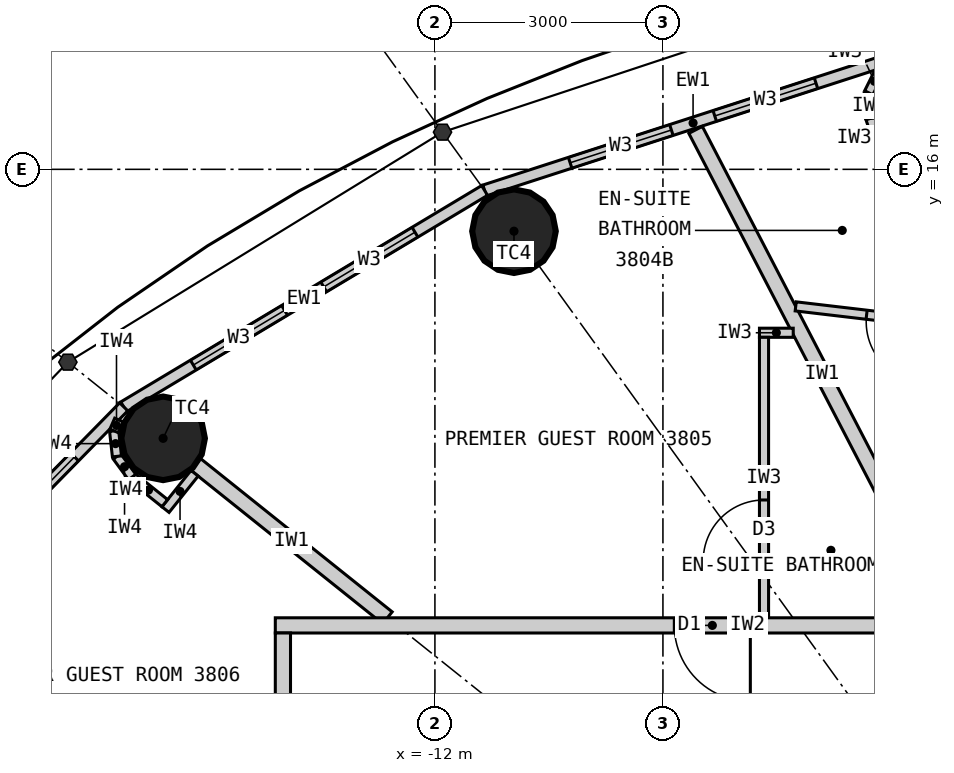
"""IFC4 building model, lengths in metres.
Left out: names, types, materials, properties, quantities, classifications, styles, units other than length and angle.
Written with IfcOpenShell. Run it as: python <this file> out.ifc"""

import sys

from ifc_helpers import new_model, si_unit, direction, frame, frame_2d, origin, origin_2d, place, context, subcontext, project, spatial, rectangle, circle, extrude, element, fill, save


model = new_model("IFC4")
c1 = context("Model", 3, precision=1e-05, world=origin(), true_north=direction((0.0, 1.0)))
c2 = subcontext(c1, "Body", "Model", "MODEL_VIEW")
j1 = project(units=[si_unit("LENGTHUNIT", "METRE"), si_unit("PLANEANGLEUNIT", "RADIAN")], contexts=[c1])
p1 = place(None, origin())
s1 = spatial("IfcSite", under=j1, at=p1, CompositionType="ELEMENT")
p2 = place(p1, origin())
s2 = spatial("IfcBuilding", under=s1, at=p2, CompositionType="ELEMENT")
p3 = place(p2, frame((0.0, 0.0, 146.7)))
s3 = spatial("IfcBuildingStorey", under=s2, at=p3, CompositionType="ELEMENT", Elevation=146.7)
for number, where, z_axis, x_axis in (
    (1, (-10.96, 15.186, 0.0), (0.0, 0.0, 1.0), (1.0, 0.0, 0.0)),
    (2, (-15.576, 12.461, 0.0), (0.0, 0.0, 1.0), (1.0, 0.0, 0.0)),
):
    element("IfcColumn", number, at=place(p3, frame(where, z_axis=z_axis, x_axis=x_axis)), inside=s3, PredefinedType="COLUMN", context=c2, shape_type="SweptSolid", body=[
        extrude(circle(Radius=0.55, at=origin_2d()), origin(), (0.0, 0.0, 1.0), 3.3),
    ])
p4 = place(p3, frame((-5.86, 17.497, 0.0), z_axis=(0.0, 0.0, 1.0), x_axis=(-0.951432482129, -0.307857486429, 0.0)))
e3 = element("IfcWall", 3, at=p4, inside=s3, PredefinedType="ELEMENTEDWALL", context=c2, shape_type="SweptSolid", body=[
    extrude(rectangle(XDim=5.766, YDim=0.15, at=frame_2d((2.883, 0.0))), origin(), (0.0, 0.0, 1.0), 3.12),
])
p5 = place(p4, frame((1.183, 0.0, 0.9)))
e4 = element("IfcOpeningElement", 4, at=p5, cuts=e3, PredefinedType="OPENING", context=c2, shape_type="SweptSolid", body=[
    extrude(rectangle(XDim=1.4, YDim=1.9, at=frame_2d((0.7, 0.95))), frame((0.0, 0.085, 0.0), z_axis=(0.0, -1.0, 0.0), x_axis=(1.0, 0.0, 0.0)), (0.0, 0.0, 1.0), 0.17),
])
p6 = place(p4, frame((3.183, 0.0, 0.9)))
e5 = element("IfcOpeningElement", 5, at=p6, cuts=e3, PredefinedType="OPENING", context=c2, shape_type="SweptSolid", body=[
    extrude(rectangle(XDim=1.4, YDim=1.9, at=frame_2d((0.7, 0.95))), frame((0.0, 0.085, 0.0), z_axis=(0.0, -1.0, 0.0), x_axis=(1.0, 0.0, 0.0)), (0.0, 0.0, 1.0), 0.17),
])
p7 = place(p3, frame((-11.346, 15.722, 0.0), z_axis=(0.0, 0.0, 1.0), x_axis=(-0.857695199231, -0.514158482587, 0.0)))
e6 = element("IfcWall", 6, at=p7, inside=s3, PredefinedType="ELEMENTEDWALL", context=c2, shape_type="SweptSolid", body=[
    extrude(rectangle(XDim=5.536, YDim=0.15, at=frame_2d((2.768, 0.0))), origin(), (0.0, 0.0, 1.0), 3.12),
])
p8 = place(p7, frame((1.068, 0.0, 0.9)))
e7 = element("IfcOpeningElement", 7, at=p8, cuts=e6, PredefinedType="OPENING", context=c2, shape_type="SweptSolid", body=[
    extrude(rectangle(XDim=1.4, YDim=1.9, at=frame_2d((0.7, 0.95))), frame((0.0, 0.085, 0.0), z_axis=(0.0, -1.0, 0.0), x_axis=(1.0, 0.0, 0.0)), (0.0, 0.0, 1.0), 0.17),
])
p9 = place(p7, frame((3.068, 0.0, 0.9)))
e8 = element("IfcOpeningElement", 8, at=p9, cuts=e6, PredefinedType="OPENING", context=c2, shape_type="SweptSolid", body=[
    extrude(rectangle(XDim=1.4, YDim=1.9, at=frame_2d((0.7, 0.95))), frame((0.0, 0.085, 0.0), z_axis=(0.0, -1.0, 0.0), x_axis=(1.0, 0.0, 0.0)), (0.0, 0.0, 1.0), 0.17),
])
p10 = place(p3, frame((-16.095, 12.876, 0.0), z_axis=(0.0, 0.0, 1.0), x_axis=(-0.700727467776, -0.71342905457, 0.0)))
e9 = element("IfcWall", 9, at=p10, inside=s3, PredefinedType="ELEMENTEDWALL", context=c2, shape_type="SweptSolid", body=[
    extrude(rectangle(XDim=5.247, YDim=0.15, at=frame_2d((2.624, 0.0))), origin(), (0.0, 0.0, 1.0), 3.12),
])
p11 = place(p10, frame((0.924, 0.0, 0.9)))
e10 = element("IfcOpeningElement", 10, at=p11, cuts=e9, PredefinedType="OPENING", context=c2, shape_type="SweptSolid", body=[
    extrude(rectangle(XDim=1.4, YDim=1.9, at=frame_2d((0.7, 0.95))), frame((0.0, 0.085, 0.0), z_axis=(0.0, -1.0, 0.0), x_axis=(1.0, 0.0, 0.0)), (0.0, 0.0, 1.0), 0.17),
])
p12 = place(p10, frame((2.924, 0.0, 0.9)))
e11 = element("IfcOpeningElement", 11, at=p12, cuts=e9, PredefinedType="OPENING", context=c2, shape_type="SweptSolid", body=[
    extrude(rectangle(XDim=1.4, YDim=1.9, at=frame_2d((0.7, 0.95))), frame((0.0, 0.085, 0.0), z_axis=(0.0, -1.0, 0.0), x_axis=(1.0, 0.0, 0.0)), (0.0, 0.0, 1.0), 0.17),
])
p13 = place(p3, frame((-5.24, 10.1, 0.0), z_axis=(0.0, 0.0, 1.0), x_axis=(-0.460532965373, 0.887642601391, 0.0)))
e12 = element("IfcWall", 12, at=p13, inside=s3, PredefinedType="PARTITIONING", context=c2, shape_type="SweptSolid", body=[
    extrude(rectangle(XDim=7.231, YDim=0.2, at=frame_2d((3.616, 0.0))), origin(), (0.0, 0.0, 1.0), 3.12),
])
p14 = place(p3, frame((-12.625, 10.1, 0.0), z_axis=(0.0, 0.0, 1.0), x_axis=(-0.780876185034, 0.624685827954, 0.0)))
e13 = element("IfcWall", 13, at=p14, inside=s3, PredefinedType="PARTITIONING", context=c2, shape_type="SweptSolid", body=[
    extrude(rectangle(XDim=3.229, YDim=0.2, at=frame_2d((1.615, 0.0))), origin(), (0.0, 0.0, 1.0), 2.42),
])
p15 = place(p3, frame((-7.253, 14.197, 0.0), z_axis=(0.0, 0.0, 1.0), x_axis=(0.993128188393, -0.117031625725, 0.0)))
e14 = element("IfcWall", 14, at=p15, inside=s3, PredefinedType="PARTITIONING", context=c2, shape_type="SweptSolid", body=[
    extrude(rectangle(XDim=2.678, YDim=0.12, at=frame_2d((1.339, 0.0))), origin(), (0.0, 0.0, 1.0), 3.12),
])
p16 = place(p15, frame((0.939, 0.0, 0.0)))
e15 = element("IfcOpeningElement", 15, at=p16, cuts=e14, PredefinedType="OPENING", context=c2, shape_type="SweptSolid", body=[
    extrude(rectangle(XDim=0.8, YDim=2.1, at=frame_2d((0.4, 1.05))), frame((0.0, 0.07, 0.0), z_axis=(0.0, -1.0, 0.0), x_axis=(1.0, 0.0, 0.0)), (0.0, 0.0, 1.0), 0.14),
])
p17 = place(p3, frame((-6.097, 16.149, 0.0), z_axis=(0.0, 0.0, 1.0), x_axis=(-0.317292604854, 0.948327687514, 0.0)))
e16 = element("IfcWall", 16, at=p17, inside=s3, PredefinedType="PARTITIONING", context=c2, shape_type="SweptSolid", body=[
    extrude(rectangle(XDim=0.55, YDim=0.12, at=frame_2d((0.275, 0.0))), origin(), (0.0, 0.0, 1.0), 3.12),
])
for number, where, z_axis, x_axis in (
    (17, (-6.271, 16.67, 0.0), (0.0, 0.0, 1.0), (-0.061, 0.998, 0.0)),
    (18, (-6.292, 17.007, 0.0), (0.0, 0.0, 1.0), (0.445, 0.895, 0.0)),
):
    element("IfcWall", number, at=place(p3, frame(where, z_axis=z_axis, x_axis=x_axis)), inside=s3, PredefinedType="PARTITIONING", context=c2, shape_type="SweptSolid", body=[
        extrude(rectangle(XDim=0.338, YDim=0.12, at=frame_2d((0.169, 0.0))), origin(), (0.0, 0.0, 1.0), 3.12),
    ])
p18 = place(p3, frame((-7.286, 13.85, 0.0), z_axis=(0.0, 0.0, 1.0), x_axis=(-1.0, 0.0, 0.0)))
e19 = element("IfcWall", 19, at=p18, inside=s3, PredefinedType="PARTITIONING", context=c2, shape_type="SweptSolid", body=[
    extrude(rectangle(XDim=0.444, YDim=0.12, at=frame_2d((0.222, 0.0))), origin(), (0.0, 0.0, 1.0), 3.12),
])
p19 = place(p3, frame((-7.67, 10.1, 0.0), z_axis=(0.0, 0.0, 1.0), x_axis=(0.0, 1.0, 0.0)))
e20 = element("IfcWall", 20, at=p19, inside=s3, PredefinedType="PARTITIONING", context=c2, shape_type="SweptSolid", body=[
    extrude(rectangle(XDim=3.69, YDim=0.12, at=frame_2d((1.845, 0.0))), origin(), (0.0, 0.0, 1.0), 3.12),
])
p20 = place(p19, frame((0.75, 0.0, 0.0)))
e21 = element("IfcOpeningElement", 21, at=p20, cuts=e20, PredefinedType="OPENING", context=c2, shape_type="SweptSolid", body=[
    extrude(rectangle(XDim=0.8, YDim=2.1, at=frame_2d((0.4, 1.05))), frame((0.0, 0.07, 0.0), z_axis=(0.0, -1.0, 0.0), x_axis=(1.0, 0.0, 0.0)), (0.0, 0.0, 1.0), 0.14),
])
p21 = place(p3, frame((-14.1, 10.0, 0.0), z_axis=(0.0, 0.0, 1.0), x_axis=(1.0, 0.0, 0.0)))
e22 = element("IfcWall", 22, at=p21, inside=s3, PredefinedType="PARTITIONING", context=c2, shape_type="SweptSolid", body=[
    extrude(rectangle(XDim=12.43, YDim=0.2, at=frame_2d((6.215, 0.0))), origin(), (0.0, 0.0, 1.0), 3.12),
])
p22 = place(p21, frame((5.25, 0.0, 0.0)))
e23 = element("IfcOpeningElement", 23, at=p22, cuts=e22, PredefinedType="OPENING", context=c2, shape_type="SweptSolid", body=[
    extrude(rectangle(XDim=1.0, YDim=2.2, at=frame_2d((0.5, 1.1))), frame((0.0, 0.11, 0.0), z_axis=(0.0, -1.0, 0.0), x_axis=(1.0, 0.0, 0.0)), (0.0, 0.0, 1.0), 0.22),
])
p23 = place(p3, frame((-14.0, 9.9, 0.0), z_axis=(0.0, 0.0, 1.0), x_axis=(0.0, -1.0, 0.0)))
e24 = element("IfcWall", 24, at=p23, inside=s3, PredefinedType="PARTITIONING", context=c2, shape_type="SweptSolid", body=[
    extrude(rectangle(XDim=8.23, YDim=0.2, at=frame_2d((4.115, 0.0))), origin(), (0.0, 0.0, 1.0), 3.12),
])
p24 = place(p23, frame((1.678, 0.0, 0.0)))
e25 = element("IfcOpeningElement", 25, at=p24, cuts=e24, PredefinedType="OPENING", context=c2, shape_type="SweptSolid", body=[
    extrude(rectangle(XDim=1.0, YDim=2.2, at=frame_2d((0.5, 1.1))), frame((0.0, 0.11, 0.0), z_axis=(0.0, -1.0, 0.0), x_axis=(1.0, 0.0, 0.0)), (0.0, 0.0, 1.0), 0.22),
])
p25 = place(p3, frame((-15.162, 12.002, 0.0), z_axis=(0.0, 0.0, 1.0), x_axis=(-0.624597762427, -0.780946627607, 0.0)))
e26 = element("IfcWall", 26, at=p25, inside=s3, PredefinedType="PARTITIONING", context=c2, shape_type="SweptSolid", body=[
    extrude(rectangle(XDim=0.612, YDim=0.12, at=frame_2d((0.306, 0.0))), origin(), (0.0, 0.0, 1.0), 3.12),
])
p26 = place(p3, frame((-15.554, 11.608, 0.0), z_axis=(0.0, 0.0, 1.0), x_axis=(-0.780695577787, 0.624911525597, 0.0)))
e27 = element("IfcWall", 27, at=p26, inside=s3, PredefinedType="PARTITIONING", context=c2, shape_type="SweptSolid", body=[
    extrude(rectangle(XDim=0.55, YDim=0.12, at=frame_2d((0.275, 0.0))), origin(), (0.0, 0.0, 1.0), 3.12),
])
p27 = place(p3, frame((-15.984, 11.952, 0.0), z_axis=(0.0, 0.0, 1.0), x_axis=(-0.592335221171, 0.805691619517, 0.0)))
e28 = element("IfcWall", 28, at=p27, inside=s3, PredefinedType="PARTITIONING", context=c2, shape_type="SweptSolid", body=[
    extrude(rectangle(XDim=0.338, YDim=0.12, at=frame_2d((0.169, 0.0))), origin(), (0.0, 0.0, 1.0), 3.12),
])
p28 = place(p3, frame((-16.184, 12.224, 0.0), z_axis=(0.0, 0.0, 1.0), x_axis=(-0.110669692975, 0.993857242795, 0.0)))
e29 = element("IfcWall", 29, at=p28, inside=s3, PredefinedType="PARTITIONING", context=c2, shape_type="SweptSolid", body=[
    extrude(rectangle(XDim=0.337, YDim=0.12, at=frame_2d((0.169, 0.0))), origin(), (0.0, 0.0, 1.0), 3.12),
])
p29 = place(p3, frame((-16.221, 12.559, 0.0), z_axis=(0.0, 0.0, 1.0), x_axis=(0.401064416249, 0.916049853457, 0.0)))
e30 = element("IfcWall", 30, at=p29, inside=s3, PredefinedType="PARTITIONING", context=c2, shape_type="SweptSolid", body=[
    extrude(rectangle(XDim=0.156, YDim=0.12, at=frame_2d((0.078, 0.0))), origin(), (0.0, 0.0, 1.0), 3.12),
])
p30 = place(p5, origin())
e31 = element("IfcWindow", 31, at=p30, inside=s3, PartitioningType="SINGLE_PANEL", PredefinedType="WINDOW", context=c2, shape_type="SweptSolid", body=[
    extrude(rectangle(XDim=1.4, YDim=1.9, at=frame_2d((0.7, 0.95))), frame((0.0, 0.03, 0.0), z_axis=(0.0, -1.0, 0.0), x_axis=(1.0, 0.0, 0.0)), (0.0, 0.0, 1.0), 0.06),
])
fill(e4, e31)
p31 = place(p6, origin())
e32 = element("IfcWindow", 32, at=p31, inside=s3, PartitioningType="SINGLE_PANEL", PredefinedType="WINDOW", context=c2, shape_type="SweptSolid", body=[
    extrude(rectangle(XDim=1.4, YDim=1.9, at=frame_2d((0.7, 0.95))), frame((0.0, 0.03, 0.0), z_axis=(0.0, -1.0, 0.0), x_axis=(1.0, 0.0, 0.0)), (0.0, 0.0, 1.0), 0.06),
])
fill(e5, e32)
p32 = place(p8, origin())
e33 = element("IfcWindow", 33, at=p32, inside=s3, PartitioningType="SINGLE_PANEL", PredefinedType="WINDOW", context=c2, shape_type="SweptSolid", body=[
    extrude(rectangle(XDim=1.4, YDim=1.9, at=frame_2d((0.7, 0.95))), frame((0.0, 0.03, 0.0), z_axis=(0.0, -1.0, 0.0), x_axis=(1.0, 0.0, 0.0)), (0.0, 0.0, 1.0), 0.06),
])
fill(e7, e33)
p33 = place(p9, origin())
e34 = element("IfcWindow", 34, at=p33, inside=s3, PartitioningType="SINGLE_PANEL", PredefinedType="WINDOW", context=c2, shape_type="SweptSolid", body=[
    extrude(rectangle(XDim=1.4, YDim=1.9, at=frame_2d((0.7, 0.95))), frame((0.0, 0.03, 0.0), z_axis=(0.0, -1.0, 0.0), x_axis=(1.0, 0.0, 0.0)), (0.0, 0.0, 1.0), 0.06),
])
fill(e8, e34)
p34 = place(p11, origin())
e35 = element("IfcWindow", 35, at=p34, inside=s3, PartitioningType="SINGLE_PANEL", PredefinedType="WINDOW", context=c2, shape_type="SweptSolid", body=[
    extrude(rectangle(XDim=1.4, YDim=1.9, at=frame_2d((0.7, 0.95))), frame((0.0, 0.03, 0.0), z_axis=(0.0, -1.0, 0.0), x_axis=(1.0, 0.0, 0.0)), (0.0, 0.0, 1.0), 0.06),
])
fill(e10, e35)
p35 = place(p16, origin())
e36 = element("IfcDoor", 36, at=p35, inside=s3, OperationType="SINGLE_SWING_RIGHT", PredefinedType="DOOR", context=c2, shape_type="SweptSolid", body=[
    extrude(rectangle(XDim=0.8, YDim=2.1, at=frame_2d((0.4, 1.05))), frame((0.0, 0.025, 0.0), z_axis=(0.0, -1.0, 0.0), x_axis=(1.0, 0.0, 0.0)), (0.0, 0.0, 1.0), 0.05),
])
fill(e15, e36)
p36 = place(p20, origin())
e37 = element("IfcDoor", 37, at=p36, inside=s3, OperationType="SINGLE_SWING_LEFT", PredefinedType="DOOR", context=c2, shape_type="SweptSolid", body=[
    extrude(rectangle(XDim=0.8, YDim=2.1, at=frame_2d((0.4, 1.05))), frame((0.0, 0.025, 0.0), z_axis=(0.0, -1.0, 0.0), x_axis=(1.0, 0.0, 0.0)), (0.0, 0.0, 1.0), 0.05),
])
fill(e21, e37)
p37 = place(p22, origin())
e38 = element("IfcDoor", 38, at=p37, inside=s3, OperationType="SINGLE_SWING_RIGHT", PredefinedType="DOOR", context=c2, shape_type="SweptSolid", body=[
    extrude(rectangle(XDim=1.0, YDim=2.2, at=frame_2d((0.5, 1.1))), frame((0.0, 0.025, 0.0), z_axis=(0.0, -1.0, 0.0), x_axis=(1.0, 0.0, 0.0)), (0.0, 0.0, 1.0), 0.05),
])
fill(e23, e38)
save(model, sys.argv[1])
